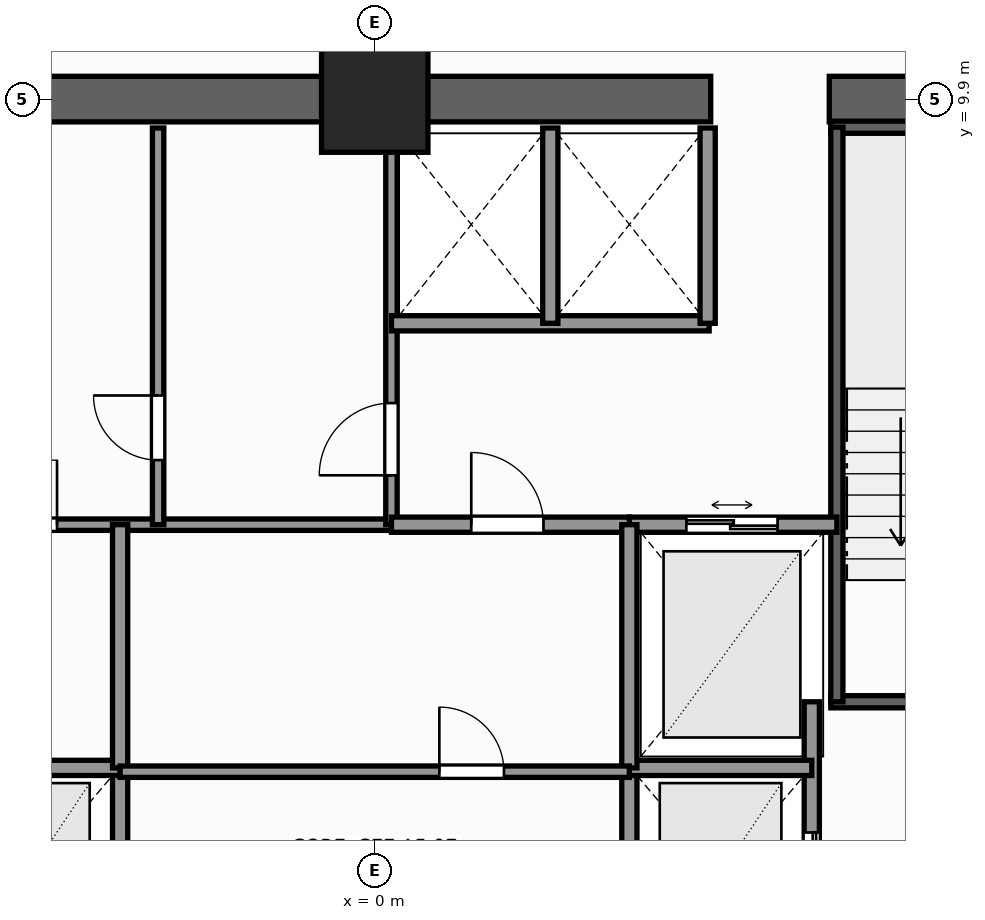
"""IFC4 building model, lengths in metres.
Left out: names, types, materials, properties, quantities, classifications, styles, units other than length and angle.
Written with IfcOpenShell. Run it as: python <this file> out.ifc"""

import sys

from ifc_helpers import new_model, si_unit, direction, frame, frame_2d, origin, origin_2d, place, context, subcontext, project, spatial, rectangle, extrude, element, fill, save


model = new_model("IFC4")
c1 = context("Model", 3, precision=1e-05, world=origin(), true_north=direction((0.0, 1.0)))
c2 = subcontext(c1, "Body", "Model", "MODEL_VIEW")
j1 = project(units=[si_unit("LENGTHUNIT", "METRE"), si_unit("PLANEANGLEUNIT", "RADIAN")], contexts=[c1])
p1 = place(None, origin())
s1 = spatial("IfcSite", under=j1, at=p1, CompositionType="ELEMENT")
p2 = place(p1, origin())
s2 = spatial("IfcBuilding", under=s1, at=p2, CompositionType="ELEMENT")
p3 = place(p2, frame((0.0, 0.0, 95.3)))
s3 = spatial("IfcBuildingStorey", under=s2, at=p3, CompositionType="ELEMENT", Elevation=95.3)
p4 = place(p3, frame((-10.2, 9.9, 0.0), z_axis=(0.0, 0.0, 1.0), x_axis=(1.0, 0.0, 0.0)))
e1 = element("IfcWall", 1, at=p4, inside=s3, PredefinedType="SHEAR", context=c2, shape_type="SweptSolid", body=[
    extrude(rectangle(XDim=14.62, YDim=0.6, at=frame_2d((7.31, 0.0))), origin(), (0.0, 0.0, 1.0), 3.3),
])
p5 = place(p3, frame((5.98, 9.9, 0.0), z_axis=(0.0, 0.0, 1.0), x_axis=(1.0, 0.0, 0.0)))
e2 = element("IfcWall", 2, at=p5, inside=s3, PredefinedType="SHEAR", context=c2, shape_type="SweptSolid", body=[
    extrude(rectangle(XDim=4.22, YDim=0.6, at=frame_2d((2.11, 0.0))), origin(), (0.0, 0.0, 1.0), 3.3),
])
p6 = place(p3, frame((0.0, 9.9, 0.0), z_axis=(0.0, 0.0, 1.0), x_axis=(1.0, 0.0, 0.0)))
e3 = element("IfcColumn", 3, at=p6, inside=s3, PredefinedType="COLUMN", context=c2, shape_type="SweptSolid", body=[
    extrude(rectangle(XDim=1.4, YDim=1.4, at=origin_2d()), origin(), (0.0, 0.0, 1.0), 3.3),
])
p7 = place(p3, frame((6.0, 1.97, 0.0), z_axis=(0.0, 0.0, 1.0), x_axis=(1.0, 0.0, 0.0)))
e4 = element("IfcWall", 4, at=p7, inside=s3, PredefinedType="SHEAR", context=c2, shape_type="SweptSolid", body=[
    extrude(rectangle(XDim=3.52, YDim=0.16, at=frame_2d((1.76, 0.0))), origin(), (0.0, 0.0, 1.0), 3.3),
])
p8 = place(p7, frame((1.15, 0.0, 0.0)))
e5 = element("IfcOpeningElement", 5, at=p8, cuts=e4, PredefinedType="OPENING", context=c2, shape_type="SweptSolid", body=[
    extrude(rectangle(XDim=1.1, YDim=2.2, at=frame_2d((0.55, 1.1))), frame((0.0, 0.09, 0.0), z_axis=(0.0, -1.0, 0.0), x_axis=(1.0, 0.0, 0.0)), (0.0, 0.0, 1.0), 0.18),
])
p9 = place(p3, frame((6.0, 9.53, 0.0), z_axis=(0.0, 0.0, 1.0), x_axis=(1.0, 0.0, 0.0)))
e6 = element("IfcWall", 6, at=p9, inside=s3, PredefinedType="SHEAR", context=c2, shape_type="SweptSolid", body=[
    extrude(rectangle(XDim=3.52, YDim=0.16, at=frame_2d((1.76, 0.0))), origin(), (0.0, 0.0, 1.0), 3.3),
])
p10 = place(p3, frame((6.08, 1.97, 0.0), z_axis=(0.0, 0.0, 1.0), x_axis=(0.0, 1.0, 0.0)))
e7 = element("IfcWall", 7, at=p10, inside=s3, PredefinedType="SHEAR", context=c2, shape_type="SweptSolid", body=[
    extrude(rectangle(XDim=7.56, YDim=0.16, at=frame_2d((3.78, 0.0))), origin(), (0.0, 0.0, 1.0), 3.3),
])
p11 = place(p3, frame((-3.35, -1.7, 0.0), z_axis=(0.0, 0.0, 1.0), x_axis=(0.0, 1.0, 0.0)))
e8 = element("IfcWall", 8, at=p11, inside=s3, PredefinedType="SOLIDWALL", context=c2, shape_type="SweptSolid", body=[
    extrude(rectangle(XDim=2.8, YDim=0.2, at=frame_2d((1.4, 0.0))), origin(), (0.0, 0.0, 1.0), 3.08),
])
p12 = place(p3, frame((-5.75, 1.1, 0.0), z_axis=(0.0, 0.0, 1.0), x_axis=(1.0, 0.0, 0.0)))
e9 = element("IfcWall", 9, at=p12, inside=s3, PredefinedType="SOLIDWALL", context=c2, shape_type="SweptSolid", body=[
    extrude(rectangle(XDim=2.4, YDim=0.2, at=frame_2d((1.2, 0.0))), origin(), (0.0, 0.0, 1.0), 3.08),
])
p13 = place(p3, frame((5.75, -3.6, 0.0), z_axis=(0.0, 0.0, 1.0), x_axis=(0.0, 1.0, 0.0)))
e10 = element("IfcWall", 10, at=p13, inside=s3, PredefinedType="SOLIDWALL", context=c2, shape_type="SweptSolid", body=[
    extrude(rectangle(XDim=5.57, YDim=0.2, at=frame_2d((2.785, 0.0))), origin(), (0.0, 0.0, 1.0), 3.08),
])
p14 = place(p13, frame((2.75, 0.0, 0.0)))
e11 = element("IfcOpeningElement", 11, at=p14, cuts=e10, PredefinedType="OPENING", context=c2, shape_type="SweptSolid", body=[
    extrude(rectangle(XDim=1.1, YDim=2.2, at=frame_2d((0.55, 1.1))), frame((0.0, 0.11, 0.0), z_axis=(0.0, -1.0, 0.0), x_axis=(1.0, 0.0, 0.0)), (0.0, 0.0, 1.0), 0.22),
])
p15 = place(p3, frame((3.35, -1.7, 0.0), z_axis=(0.0, 0.0, 1.0), x_axis=(0.0, 1.0, 0.0)))
e12 = element("IfcWall", 12, at=p15, inside=s3, PredefinedType="SOLIDWALL", context=c2, shape_type="SweptSolid", body=[
    extrude(rectangle(XDim=2.8, YDim=0.2, at=frame_2d((1.4, 0.0))), origin(), (0.0, 0.0, 1.0), 3.08),
])
p16 = place(p3, frame((3.35, 1.1, 0.0), z_axis=(0.0, 0.0, 1.0), x_axis=(1.0, 0.0, 0.0)))
e13 = element("IfcWall", 13, at=p16, inside=s3, PredefinedType="SOLIDWALL", context=c2, shape_type="SweptSolid", body=[
    extrude(rectangle(XDim=2.4, YDim=0.2, at=frame_2d((1.2, 0.0))), origin(), (0.0, 0.0, 1.0), 3.08),
])
p17 = place(p3, frame((3.35, 4.3, 0.0), z_axis=(0.0, 0.0, 1.0), x_axis=(1.0, 0.0, 0.0)))
e14 = element("IfcWall", 14, at=p17, inside=s3, PredefinedType="SOLIDWALL", context=c2, shape_type="SweptSolid", body=[
    extrude(rectangle(XDim=2.73, YDim=0.2, at=frame_2d((1.365, 0.0))), origin(), (0.0, 0.0, 1.0), 3.08),
])
p18 = place(p17, frame((0.75, 0.0, 0.0)))
e15 = element("IfcOpeningElement", 15, at=p18, cuts=e14, PredefinedType="OPENING", context=c2, shape_type="SweptSolid", body=[
    extrude(rectangle(XDim=1.2, YDim=2.25, at=frame_2d((0.6, 1.125))), frame((0.0, 0.11, 0.0), z_axis=(0.0, -1.0, 0.0), x_axis=(1.0, 0.0, 0.0)), (0.0, 0.0, 1.0), 0.22),
])
p19 = place(p3, frame((-6.08, 4.3, 0.0), z_axis=(0.0, 0.0, 1.0), x_axis=(1.0, 0.0, 0.0)))
e16 = element("IfcWall", 16, at=p19, inside=s3, PredefinedType="PARTITIONING", context=c2, shape_type="SweptSolid", body=[
    extrude(rectangle(XDim=6.3, YDim=0.15, at=frame_2d((3.15, 0.0))), origin(), (0.0, 0.0, 1.0), 3.08),
])
p20 = place(p19, frame((1.05, 0.0, 0.0)))
e17 = element("IfcOpeningElement", 17, at=p20, cuts=e16, PredefinedType="OPENING", context=c2, shape_type="SweptSolid", body=[
    extrude(rectangle(XDim=0.85, YDim=2.03, at=frame_2d((0.425, 1.015))), frame((0.0, 0.085, 0.0), z_axis=(0.0, -1.0, 0.0), x_axis=(1.0, 0.0, 0.0)), (0.0, 0.0, 1.0), 0.17),
])
p21 = place(p3, frame((0.22, 4.3, 0.0), z_axis=(0.0, 0.0, 1.0), x_axis=(0.0, 1.0, 0.0)))
e18 = element("IfcWall", 18, at=p21, inside=s3, PredefinedType="PARTITIONING", context=c2, shape_type="SweptSolid", body=[
    extrude(rectangle(XDim=5.22, YDim=0.15, at=frame_2d((2.61, 0.0))), origin(), (0.0, 0.0, 1.0), 3.08),
])
p22 = place(p21, frame((0.65, 0.0, 0.0)))
e19 = element("IfcOpeningElement", 19, at=p22, cuts=e18, PredefinedType="OPENING", context=c2, shape_type="SweptSolid", body=[
    extrude(rectangle(XDim=0.95, YDim=2.06, at=frame_2d((0.475, 1.03))), frame((0.0, 0.085, 0.0), z_axis=(0.0, -1.0, 0.0), x_axis=(1.0, 0.0, 0.0)), (0.0, 0.0, 1.0), 0.17),
])
p23 = place(p3, frame((-2.85, 4.3, 0.0), z_axis=(0.0, 0.0, 1.0), x_axis=(0.0, 1.0, 0.0)))
e20 = element("IfcWall", 20, at=p23, inside=s3, PredefinedType="PARTITIONING", context=c2, shape_type="SweptSolid", body=[
    extrude(rectangle(XDim=5.22, YDim=0.15, at=frame_2d((2.61, 0.0))), origin(), (0.0, 0.0, 1.0), 3.08),
])
p24 = place(p23, frame((0.85, 0.0, 0.0)))
e21 = element("IfcOpeningElement", 21, at=p24, cuts=e20, PredefinedType="OPENING", context=c2, shape_type="SweptSolid", body=[
    extrude(rectangle(XDim=0.85, YDim=2.03, at=frame_2d((0.425, 1.015))), frame((0.0, 0.085, 0.0), z_axis=(0.0, -1.0, 0.0), x_axis=(1.0, 0.0, 0.0)), (0.0, 0.0, 1.0), 0.17),
])
p25 = place(p3, frame((0.22, 6.95, 0.0), z_axis=(0.0, 0.0, 1.0), x_axis=(1.0, 0.0, 0.0)))
e22 = element("IfcWall", 22, at=p25, inside=s3, PredefinedType="SOLIDWALL", context=c2, shape_type="SweptSolid", body=[
    extrude(rectangle(XDim=4.18, YDim=0.2, at=frame_2d((2.09, 0.0))), origin(), (0.0, 0.0, 1.0), 3.08),
])
for number, where, z_axis, x_axis in (
    (23, (4.38, 6.95, 0.0), (0.0, 0.0, 1.0), (0.0, 1.0, 0.0)),
    (24, (2.31, 6.95, 0.0), (0.0, 0.0, 1.0), (0.0, 1.0, 0.0)),
):
    element("IfcWall", number, at=place(p3, frame(where, z_axis=z_axis, x_axis=x_axis)), inside=s3, PredefinedType="SOLIDWALL", context=c2, shape_type="SweptSolid", body=[
        extrude(rectangle(XDim=2.57, YDim=0.2, at=frame_2d((1.285, 0.0))), origin(), (0.0, 0.0, 1.0), 3.08),
    ])
p26 = place(p3, frame((0.22, 4.3, 0.0), z_axis=(0.0, 0.0, 1.0), x_axis=(1.0, 0.0, 0.0)))
e25 = element("IfcWall", 25, at=p26, inside=s3, PredefinedType="SOLIDWALL", context=c2, shape_type="SweptSolid", body=[
    extrude(rectangle(XDim=3.13, YDim=0.2, at=frame_2d((1.565, 0.0))), origin(), (0.0, 0.0, 1.0), 3.08),
])
p27 = place(p26, frame((1.05, 0.0, 0.0)))
e26 = element("IfcOpeningElement", 26, at=p27, cuts=e25, PredefinedType="OPENING", context=c2, shape_type="SweptSolid", body=[
    extrude(rectangle(XDim=0.95, YDim=2.06, at=frame_2d((0.475, 1.03))), frame((0.0, 0.11, 0.0), z_axis=(0.0, -1.0, 0.0), x_axis=(1.0, 0.0, 0.0)), (0.0, 0.0, 1.0), 0.22),
])
for number, where, z_axis, x_axis in (
    (27, (-3.35, 1.1, 0.0), (0.0, 0.0, 1.0), (0.0, 1.0, 0.0)),
    (28, (3.35, 1.1, 0.0), (0.0, 0.0, 1.0), (0.0, 1.0, 0.0)),
):
    element("IfcWall", number, at=place(p3, frame(where, z_axis=z_axis, x_axis=x_axis)), inside=s3, PredefinedType="SOLIDWALL", context=c2, shape_type="SweptSolid", body=[
        extrude(rectangle(XDim=3.2, YDim=0.2, at=frame_2d((1.6, 0.0))), origin(), (0.0, 0.0, 1.0), 3.08),
    ])
p28 = place(p3, frame((-3.35, 1.05, 0.0), z_axis=(0.0, 0.0, 1.0), x_axis=(1.0, 0.0, 0.0)))
e29 = element("IfcWall", 29, at=p28, inside=s3, PredefinedType="PARTITIONING", context=c2, shape_type="SweptSolid", body=[
    extrude(rectangle(XDim=6.7, YDim=0.15, at=frame_2d((3.35, 0.0))), origin(), (0.0, 0.0, 1.0), 3.08),
])
p29 = place(p28, frame((4.2, 0.0, 0.0)))
e30 = element("IfcOpeningElement", 30, at=p29, cuts=e29, PredefinedType="OPENING", context=c2, shape_type="SweptSolid", body=[
    extrude(rectangle(XDim=0.85, YDim=2.03, at=frame_2d((0.425, 1.015))), frame((0.0, 0.085, 0.0), z_axis=(0.0, -1.0, 0.0), x_axis=(1.0, 0.0, 0.0)), (0.0, 0.0, 1.0), 0.17),
])
p30 = place(p14, origin())
e31 = element("IfcDoor", 31, at=p30, inside=s3, OperationType="DOUBLE_DOOR_SLIDING", PredefinedType="DOOR", context=c2, shape_type="SweptSolid", body=[
    extrude(rectangle(XDim=1.1, YDim=2.2, at=frame_2d((0.55, 1.1))), frame((0.0, 0.025, 0.0), z_axis=(0.0, -1.0, 0.0), x_axis=(1.0, 0.0, 0.0)), (0.0, 0.0, 1.0), 0.05),
])
fill(e11, e31)
p31 = place(p18, origin())
e32 = element("IfcDoor", 32, at=p31, inside=s3, OperationType="DOUBLE_DOOR_SLIDING", PredefinedType="DOOR", context=c2, shape_type="SweptSolid", body=[
    extrude(rectangle(XDim=1.2, YDim=2.25, at=frame_2d((0.6, 1.125))), frame((0.0, 0.025, 0.0), z_axis=(0.0, -1.0, 0.0), x_axis=(1.0, 0.0, 0.0)), (0.0, 0.0, 1.0), 0.05),
])
fill(e15, e32)
p32 = place(p22, origin())
e33 = element("IfcDoor", 33, at=p32, inside=s3, OperationType="SINGLE_SWING_LEFT", PredefinedType="DOOR", context=c2, shape_type="SweptSolid", body=[
    extrude(rectangle(XDim=0.95, YDim=2.06, at=frame_2d((0.475, 1.03))), frame((0.0, 0.025, 0.0), z_axis=(0.0, -1.0, 0.0), x_axis=(1.0, 0.0, 0.0)), (0.0, 0.0, 1.0), 0.05),
])
fill(e19, e33)
p33 = place(p24, origin())
e34 = element("IfcDoor", 34, at=p33, inside=s3, OperationType="SINGLE_SWING_RIGHT", PredefinedType="DOOR", context=c2, shape_type="SweptSolid", body=[
    extrude(rectangle(XDim=0.85, YDim=2.03, at=frame_2d((0.425, 1.015))), frame((0.0, 0.025, 0.0), z_axis=(0.0, -1.0, 0.0), x_axis=(1.0, 0.0, 0.0)), (0.0, 0.0, 1.0), 0.05),
])
fill(e21, e34)
p34 = place(p27, origin())
e35 = element("IfcDoor", 35, at=p34, inside=s3, OperationType="SINGLE_SWING_LEFT", PredefinedType="DOOR", context=c2, shape_type="SweptSolid", body=[
    extrude(rectangle(XDim=0.95, YDim=2.06, at=frame_2d((0.475, 1.03))), frame((0.0, 0.025, 0.0), z_axis=(0.0, -1.0, 0.0), x_axis=(1.0, 0.0, 0.0)), (0.0, 0.0, 1.0), 0.05),
])
fill(e26, e35)
p35 = place(p29, origin())
e36 = element("IfcDoor", 36, at=p35, inside=s3, OperationType="SINGLE_SWING_LEFT", PredefinedType="DOOR", context=c2, shape_type="SweptSolid", body=[
    extrude(rectangle(XDim=0.85, YDim=2.03, at=frame_2d((0.425, 1.015))), frame((0.0, 0.025, 0.0), z_axis=(0.0, -1.0, 0.0), x_axis=(1.0, 0.0, 0.0)), (0.0, 0.0, 1.0), 0.05),
])
fill(e30, e36)
p36 = place(p20, origin())
e37 = element("IfcDoor", 37, at=p36, inside=s3, OperationType="SINGLE_SWING_RIGHT", PredefinedType="DOOR", context=c2, shape_type="SweptSolid", body=[
    extrude(rectangle(XDim=0.85, YDim=2.03, at=frame_2d((0.425, 1.015))), frame((0.0, 0.025, 0.0), z_axis=(0.0, -1.0, 0.0), x_axis=(1.0, 0.0, 0.0)), (0.0, 0.0, 1.0), 0.05),
])
fill(e17, e37)
save(model, sys.argv[1])
